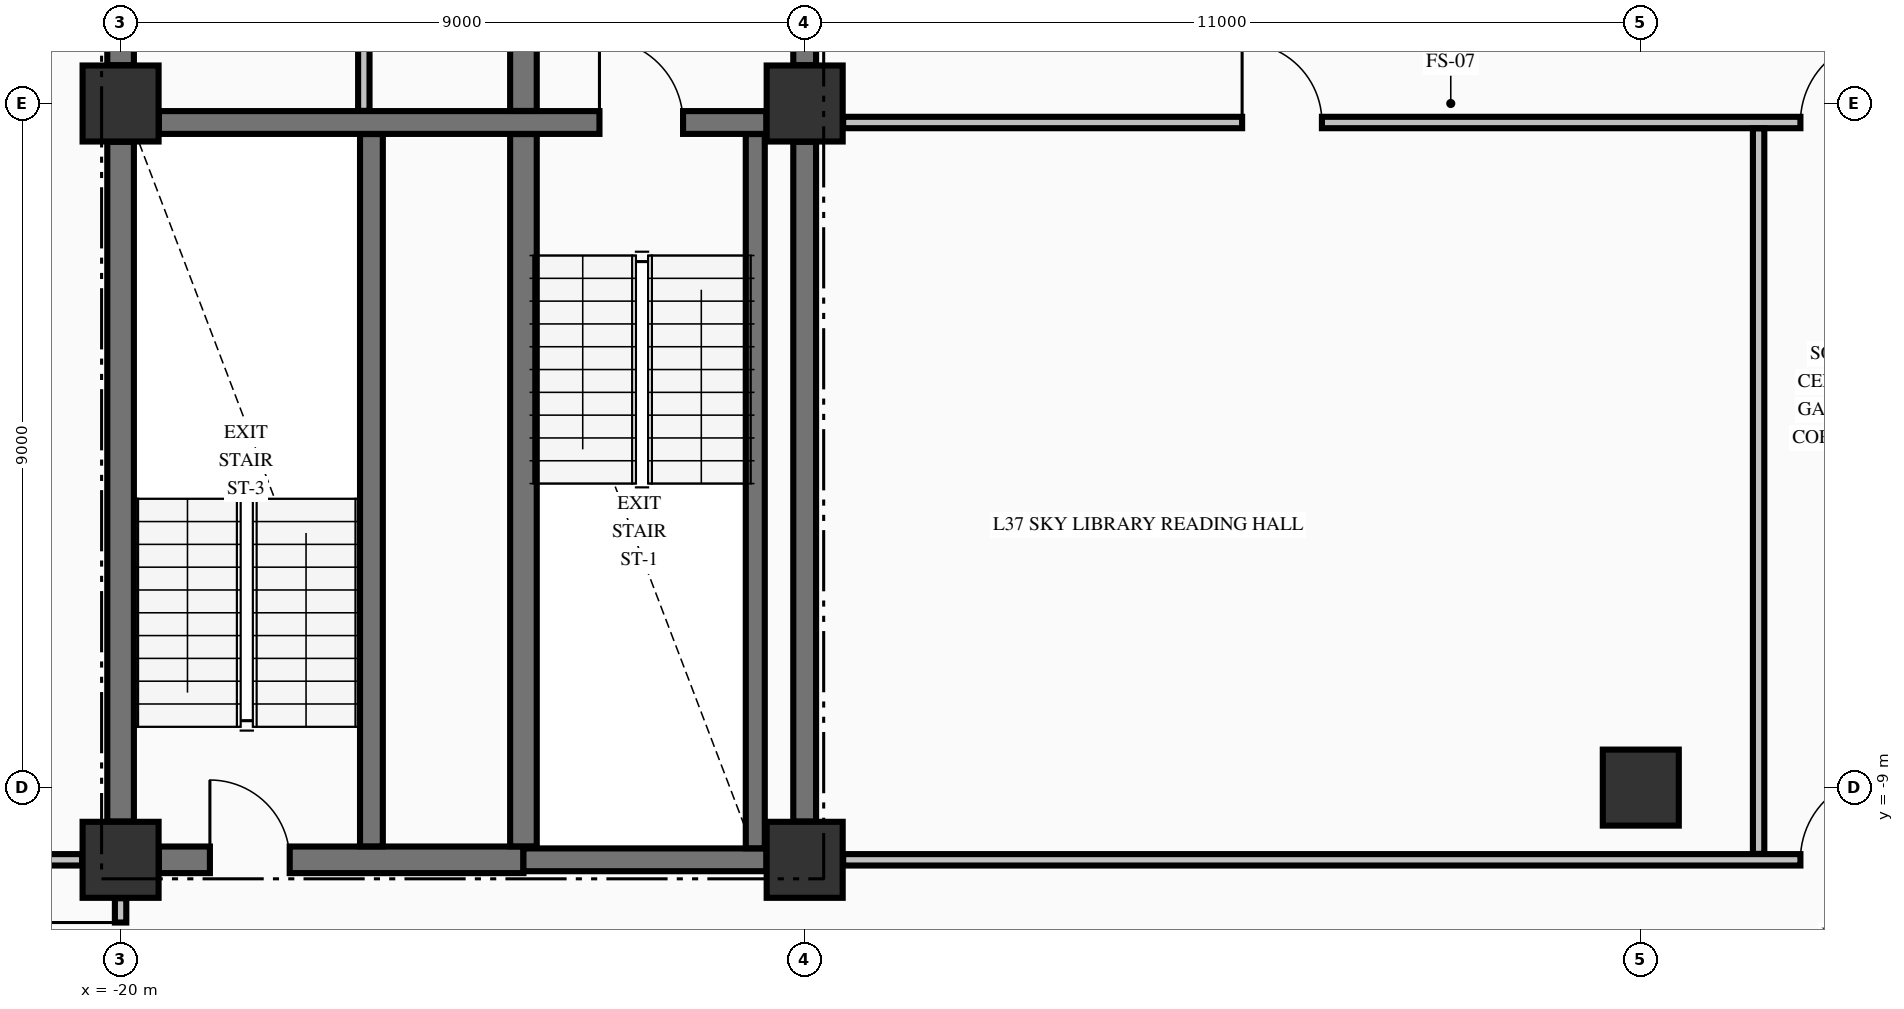
"""IFC4 building model, lengths in metres.
Left out: names, types, materials, properties, quantities, classifications, styles, units other than length and angle.
Written with IfcOpenShell. Run it as: python <this file> out.ifc"""

import sys

from ifc_helpers import new_model, si_unit, direction, frame, frame_2d, origin, origin_2d, place, context, subcontext, project, spatial, rectangle, extrude, element, fill, save


model = new_model("IFC4")
c1 = context("Model", 3, precision=1e-05, world=origin(), true_north=direction((0.0, 1.0)))
c2 = subcontext(c1, "Body", "Model", "MODEL_VIEW")
j1 = project(units=[si_unit("LENGTHUNIT", "METRE"), si_unit("PLANEANGLEUNIT", "RADIAN")], contexts=[c1])
p1 = place(None, origin())
s1 = spatial("IfcSite", under=j1, at=p1, CompositionType="ELEMENT")
p2 = place(p1, origin())
s2 = spatial("IfcBuilding", under=s1, at=p2, CompositionType="ELEMENT")
p3 = place(p2, frame((0.0, 0.0, 146.34)))
s3 = spatial("IfcBuildingStorey", under=s2, at=p3, CompositionType="ELEMENT", Elevation=146.34)
for number, where, z_axis, x_axis in (
    (1, (-20.0, -9.95, -0.25), (0.0, 0.0, 1.0), (1.0, 0.0, 0.0)),
    (2, (-11.0, -9.95, -0.25), (0.0, 0.0, 1.0), (1.0, 0.0, 0.0)),
    (3, (-11.0, 0.0, -0.25), (0.0, 0.0, 1.0), (1.0, 0.0, 0.0)),
    (4, (0.0, -9.0, -0.25), (0.0, 0.0, 1.0), (1.0, 0.0, 0.0)),
    (5, (-20.0, 0.0, -0.25), (0.0, 0.0, 1.0), (1.0, 0.0, 0.0)),
):
    element("IfcColumn", number, at=place(p3, frame(where, z_axis=z_axis, x_axis=x_axis)), inside=s3, PredefinedType="COLUMN", context=c2, shape_type="SweptSolid", body=[
        extrude(rectangle(XDim=1.0, YDim=1.0, at=origin_2d()), origin(), (0.0, 0.0, 1.0), 3.57),
    ])
p4 = place(p3, frame((-19.496, -9.95, 0.0), z_axis=(0.0, 0.0, 1.0), x_axis=(1.0, 0.0, 0.0)))
e6 = element("IfcWall", 6, at=p4, inside=s3, PredefinedType="SHEAR", context=c2, shape_type="SweptSolid", body=[
    extrude(rectangle(XDim=4.796, YDim=0.35, at=frame_2d((2.398, 0.0))), origin(), (0.0, 0.0, 1.0), 3.32),
])
p5 = place(p4, frame((0.671, 0.0, 0.0)))
e7 = element("IfcOpeningElement", 7, at=p5, cuts=e6, PredefinedType="OPENING", context=c2, shape_type="SweptSolid", body=[
    extrude(rectangle(XDim=1.05, YDim=2.15, at=frame_2d((0.525, 1.075))), frame((0.0, 0.185, 0.0), z_axis=(0.0, -1.0, 0.0), x_axis=(1.0, 0.0, 0.0)), (0.0, 0.0, 1.0), 0.37),
])
p6 = place(p3, frame((-14.7, -9.95, 0.0), z_axis=(0.0, 0.0, 1.0), x_axis=(1.0, 0.0, 0.0)))
e8 = element("IfcWall", 8, at=p6, inside=s3, PredefinedType="SHEAR", context=c2, shape_type="SweptSolid", body=[
    extrude(rectangle(XDim=3.196, YDim=0.3, at=frame_2d((1.598, 0.0))), origin(), (0.0, 0.0, 1.0), 3.32),
])
p7 = place(p3, frame((-19.496, -0.25, 0.0), z_axis=(0.0, 0.0, 1.0), x_axis=(1.0, 0.0, 0.0)))
e9 = element("IfcWall", 9, at=p7, inside=s3, PredefinedType="SHEAR", context=c2, shape_type="SweptSolid", body=[
    extrude(rectangle(XDim=7.992, YDim=0.3, at=frame_2d((3.996, 0.0))), origin(), (0.0, 0.0, 1.0), 3.32),
])
p8 = place(p7, frame((5.796, 0.0, 0.0)))
e10 = element("IfcOpeningElement", 10, at=p8, cuts=e9, PredefinedType="OPENING", context=c2, shape_type="SweptSolid", body=[
    extrude(rectangle(XDim=1.1, YDim=2.15, at=frame_2d((0.55, 1.075))), frame((0.0, 0.16, 0.0), z_axis=(0.0, -1.0, 0.0), x_axis=(1.0, 0.0, 0.0)), (0.0, 0.0, 1.0), 0.32),
])
p9 = place(p3, frame((-27.835, -9.95, 0.0), z_axis=(0.0, 0.0, 1.0), x_axis=(1.0, 0.0, 0.0)))
e11 = element("IfcWall", 11, at=p9, inside=s3, PredefinedType="PARTITIONING", context=c2, shape_type="SweptSolid", body=[
    extrude(rectangle(XDim=7.329, YDim=0.15, at=frame_2d((3.665, 0.0))), origin(), (0.0, 0.0, 1.0), 3.32),
])
p10 = place(p9, frame((3.335, 0.0, 0.0)))
e12 = element("IfcOpeningElement", 12, at=p10, cuts=e11, PredefinedType="OPENING", context=c2, shape_type="SweptSolid", body=[
    extrude(rectangle(XDim=1.0, YDim=2.15, at=frame_2d((0.5, 1.075))), frame((0.0, 0.085, 0.0), z_axis=(0.0, -1.0, 0.0), x_axis=(1.0, 0.0, 0.0)), (0.0, 0.0, 1.0), 0.17),
])
p11 = place(p3, frame((-10.494, -9.95, 0.0), z_axis=(0.0, 0.0, 1.0), x_axis=(1.0, 0.0, 0.0)))
e13 = element("IfcWall", 13, at=p11, inside=s3, PredefinedType="PARTITIONING", context=c2, shape_type="SweptSolid", body=[
    extrude(rectangle(XDim=20.988, YDim=0.15, at=frame_2d((10.494, 0.0))), origin(), (0.0, 0.0, 1.0), 3.32),
])
p12 = place(p11, frame((12.594, 0.0, 0.0)))
e14 = element("IfcOpeningElement", 14, at=p12, cuts=e13, PredefinedType="OPENING", context=c2, shape_type="SweptSolid", body=[
    extrude(rectangle(XDim=1.1, YDim=2.15, at=frame_2d((0.55, 1.075))), frame((0.0, 0.085, 0.0), z_axis=(0.0, -1.0, 0.0), x_axis=(1.0, 0.0, 0.0)), (0.0, 0.0, 1.0), 0.17),
])
p13 = place(p11, frame((18.799, 0.0, 0.0)))
e15 = element("IfcOpeningElement", 15, at=p13, cuts=e13, PredefinedType="OPENING", context=c2, shape_type="SweptSolid", body=[
    extrude(rectangle(XDim=0.95, YDim=2.15, at=frame_2d((0.475, 1.075))), frame((0.0, 0.085, 0.0), z_axis=(0.0, -1.0, 0.0), x_axis=(1.0, 0.0, 0.0)), (0.0, 0.0, 1.0), 0.17),
])
p14 = place(p3, frame((-10.494, -0.25, 0.0), z_axis=(0.0, 0.0, 1.0), x_axis=(1.0, 0.0, 0.0)))
e16 = element("IfcWall", 16, at=p14, inside=s3, PredefinedType="PARTITIONING", context=c2, shape_type="SweptSolid", body=[
    extrude(rectangle(XDim=20.988, YDim=0.15, at=frame_2d((10.494, 0.0))), origin(), (0.0, 0.0, 1.0), 3.32),
])
p15 = place(p14, frame((12.594, 0.0, 0.0)))
e17 = element("IfcOpeningElement", 17, at=p15, cuts=e16, PredefinedType="OPENING", context=c2, shape_type="SweptSolid", body=[
    extrude(rectangle(XDim=1.1, YDim=2.15, at=frame_2d((0.55, 1.075))), frame((0.0, 0.085, 0.0), z_axis=(0.0, -1.0, 0.0), x_axis=(1.0, 0.0, 0.0)), (0.0, 0.0, 1.0), 0.17),
])
p16 = place(p14, frame((5.249, 0.0, 0.0)))
e18 = element("IfcOpeningElement", 18, at=p16, cuts=e16, PredefinedType="OPENING", context=c2, shape_type="SweptSolid", body=[
    extrude(rectangle(XDim=1.05, YDim=2.15, at=frame_2d((0.525, 1.075))), frame((0.0, 0.085, 0.0), z_axis=(0.0, -1.0, 0.0), x_axis=(1.0, 0.0, 0.0)), (0.0, 0.0, 1.0), 0.17),
])
p17 = place(p14, frame((17.399, 0.0, 0.0)))
e19 = element("IfcOpeningElement", 19, at=p17, cuts=e16, PredefinedType="OPENING", context=c2, shape_type="SweptSolid", body=[
    extrude(rectangle(XDim=0.95, YDim=2.15, at=frame_2d((0.475, 1.075))), frame((0.0, 0.085, 0.0), z_axis=(0.0, -1.0, 0.0), x_axis=(1.0, 0.0, 0.0)), (0.0, 0.0, 1.0), 0.17),
])
p18 = place(p3, frame((-20.0, -9.446, 0.0), z_axis=(0.0, 0.0, 1.0), x_axis=(0.0, 1.0, 0.0)))
e20 = element("IfcWall", 20, at=p18, inside=s3, PredefinedType="SHEAR", context=c2, shape_type="SweptSolid", body=[
    extrude(rectangle(XDim=8.942, YDim=0.35, at=frame_2d((4.471, 0.0))), origin(), (0.0, 0.0, 1.0), 3.32),
])
p19 = place(p3, frame((-20.0, 0.504, 0.0), z_axis=(0.0, 0.0, 1.0), x_axis=(0.0, 1.0, 0.0)))
e21 = element("IfcWall", 21, at=p19, inside=s3, PredefinedType="SHEAR", context=c2, shape_type="SweptSolid", body=[
    extrude(rectangle(XDim=9.492, YDim=0.35, at=frame_2d((4.746, 0.0))), origin(), (0.0, 0.0, 1.0), 3.32),
])
p20 = place(p3, frame((-16.7, -9.773, 0.0), z_axis=(0.0, 0.0, 1.0), x_axis=(0.0, 1.0, 0.0)))
e22 = element("IfcWall", 22, at=p20, inside=s3, PredefinedType="SHEAR", context=c2, shape_type="SweptSolid", body=[
    extrude(rectangle(XDim=9.371, YDim=0.3, at=frame_2d((4.686, 0.0))), origin(), (0.0, 0.0, 1.0), 3.32),
])
p21 = place(p3, frame((-14.7, -9.773, 0.0), z_axis=(0.0, 0.0, 1.0), x_axis=(0.0, 1.0, 0.0)))
e23 = element("IfcWall", 23, at=p21, inside=s3, PredefinedType="SHEAR", context=c2, shape_type="SweptSolid", body=[
    extrude(rectangle(XDim=9.371, YDim=0.35, at=frame_2d((4.686, 0.0))), origin(), (0.0, 0.0, 1.0), 3.32),
])
p22 = place(p3, frame((-14.7, -0.098, 0.0), z_axis=(0.0, 0.0, 1.0), x_axis=(0.0, 1.0, 0.0)))
e24 = element("IfcWall", 24, at=p22, inside=s3, PredefinedType="SHEAR", context=c2, shape_type="SweptSolid", body=[
    extrude(rectangle(XDim=2.846, YDim=0.35, at=frame_2d((1.423, 0.0))), origin(), (0.0, 0.0, 1.0), 3.32),
])
p23 = place(p3, frame((-11.65, -9.798, 0.0), z_axis=(0.0, 0.0, 1.0), x_axis=(0.0, 1.0, 0.0)))
e25 = element("IfcWall", 25, at=p23, inside=s3, PredefinedType="SOLIDWALL", context=c2, shape_type="SweptSolid", body=[
    extrude(rectangle(XDim=9.396, YDim=0.25, at=frame_2d((4.698, 0.0))), origin(), (0.0, 0.0, 1.0), 3.32),
])
p24 = place(p3, frame((-11.0, -9.446, 0.0), z_axis=(0.0, 0.0, 1.0), x_axis=(0.0, 1.0, 0.0)))
e26 = element("IfcWall", 26, at=p24, inside=s3, PredefinedType="SHEAR", context=c2, shape_type="SweptSolid", body=[
    extrude(rectangle(XDim=8.942, YDim=0.3, at=frame_2d((4.471, 0.0))), origin(), (0.0, 0.0, 1.0), 3.32),
])
p25 = place(p3, frame((-11.0, 0.504, 0.0), z_axis=(0.0, 0.0, 1.0), x_axis=(0.0, 1.0, 0.0)))
e27 = element("IfcWall", 27, at=p25, inside=s3, PredefinedType="SHEAR", context=c2, shape_type="SweptSolid", body=[
    extrude(rectangle(XDim=2.244, YDim=0.3, at=frame_2d((1.122, 0.0))), origin(), (0.0, 0.0, 1.0), 3.32),
])
p26 = place(p25, frame((0.596, 0.0, 0.0)))
e28 = element("IfcOpeningElement", 28, at=p26, cuts=e27, PredefinedType="OPENING", context=c2, shape_type="SweptSolid", body=[
    extrude(rectangle(XDim=1.1, YDim=2.15, at=frame_2d((0.55, 1.075))), frame((0.0, 0.16, 0.0), z_axis=(0.0, -1.0, 0.0), x_axis=(1.0, 0.0, 0.0)), (0.0, 0.0, 1.0), 0.32),
])
p27 = place(p3, frame((-20.0, -12.472, 0.0), z_axis=(0.0, 0.0, 1.0), x_axis=(0.0, 1.0, 0.0)))
e29 = element("IfcWall", 29, at=p27, inside=s3, PredefinedType="PARTITIONING", context=c2, shape_type="SweptSolid", body=[
    extrude(rectangle(XDim=2.016, YDim=0.15, at=frame_2d((1.008, 0.0))), origin(), (0.0, 0.0, 1.0), 2.81),
])
p28 = place(p27, frame((0.747, 0.0, 0.0)))
e30 = element("IfcOpeningElement", 30, at=p28, cuts=e29, PredefinedType="OPENING", context=c2, shape_type="SweptSolid", body=[
    extrude(rectangle(XDim=0.95, YDim=2.15, at=frame_2d((0.475, 1.075))), frame((0.0, 0.085, 0.0), z_axis=(0.0, -1.0, 0.0), x_axis=(1.0, 0.0, 0.0)), (0.0, 0.0, 1.0), 0.17),
])
p29 = place(p3, frame((-16.8, -0.097, 0.0), z_axis=(0.0, 0.0, 1.0), x_axis=(0.0, 1.0, 0.0)))
e31 = element("IfcWall", 31, at=p29, inside=s3, PredefinedType="PARTITIONING", context=c2, shape_type="SweptSolid", body=[
    extrude(rectangle(XDim=4.819, YDim=0.15, at=frame_2d((2.409, 0.0))), origin(), (0.0, 0.0, 1.0), 3.32),
])
p30 = place(p3, frame((1.55, -9.872, 0.0), z_axis=(0.0, 0.0, 1.0), x_axis=(0.0, 1.0, 0.0)))
e32 = element("IfcWall", 32, at=p30, inside=s3, PredefinedType="PARTITIONING", context=c2, shape_type="SweptSolid", body=[
    extrude(rectangle(XDim=9.544, YDim=0.15, at=frame_2d((4.772, 0.0))), origin(), (0.0, 0.0, 1.0), 3.32),
])
p31 = place(p8, origin())
e33 = element("IfcDoor", 33, at=p31, inside=s3, OperationType="SINGLE_SWING_LEFT", PredefinedType="DOOR", context=c2, shape_type="SweptSolid", body=[
    extrude(rectangle(XDim=1.1, YDim=2.15, at=frame_2d((0.55, 1.075))), frame((0.0, 0.025, 0.0), z_axis=(0.0, -1.0, 0.0), x_axis=(1.0, 0.0, 0.0)), (0.0, 0.0, 1.0), 0.05),
])
fill(e10, e33)
p32 = place(p5, origin())
e34 = element("IfcDoor", 34, at=p32, inside=s3, OperationType="SINGLE_SWING_LEFT", PredefinedType="DOOR", context=c2, shape_type="SweptSolid", body=[
    extrude(rectangle(XDim=1.05, YDim=2.15, at=frame_2d((0.525, 1.075))), frame((0.0, 0.025, 0.0), z_axis=(0.0, -1.0, 0.0), x_axis=(1.0, 0.0, 0.0)), (0.0, 0.0, 1.0), 0.05),
])
fill(e7, e34)
p33 = place(p12, origin())
e35 = element("IfcDoor", 35, at=p33, inside=s3, OperationType="SINGLE_SWING_RIGHT", PredefinedType="DOOR", context=c2, shape_type="SweptSolid", body=[
    extrude(rectangle(XDim=1.1, YDim=2.15, at=frame_2d((0.55, 1.075))), frame((0.0, 0.025, 0.0), z_axis=(0.0, -1.0, 0.0), x_axis=(1.0, 0.0, 0.0)), (0.0, 0.0, 1.0), 0.05),
])
fill(e14, e35)
p34 = place(p15, origin())
e36 = element("IfcDoor", 36, at=p34, inside=s3, OperationType="SINGLE_SWING_RIGHT", PredefinedType="DOOR", context=c2, shape_type="SweptSolid", body=[
    extrude(rectangle(XDim=1.1, YDim=2.15, at=frame_2d((0.55, 1.075))), frame((0.0, 0.025, 0.0), z_axis=(0.0, -1.0, 0.0), x_axis=(1.0, 0.0, 0.0)), (0.0, 0.0, 1.0), 0.05),
])
fill(e17, e36)
p35 = place(p16, origin())
e37 = element("IfcDoor", 37, at=p35, inside=s3, OperationType="SINGLE_SWING_LEFT", PredefinedType="DOOR", context=c2, shape_type="SweptSolid", body=[
    extrude(rectangle(XDim=1.05, YDim=2.15, at=frame_2d((0.525, 1.075))), frame((0.0, 0.025, 0.0), z_axis=(0.0, -1.0, 0.0), x_axis=(1.0, 0.0, 0.0)), (0.0, 0.0, 1.0), 0.05),
])
fill(e18, e37)
p36 = place(p28, origin())
e38 = element("IfcDoor", 38, at=p36, inside=s3, OperationType="SINGLE_SWING_RIGHT", PredefinedType="DOOR", context=c2, shape_type="SweptSolid", body=[
    extrude(rectangle(XDim=0.95, YDim=2.15, at=frame_2d((0.475, 1.075))), frame((0.0, 0.025, 0.0), z_axis=(0.0, -1.0, 0.0), x_axis=(1.0, 0.0, 0.0)), (0.0, 0.0, 1.0), 0.05),
])
fill(e30, e38)
save(model, sys.argv[1])
